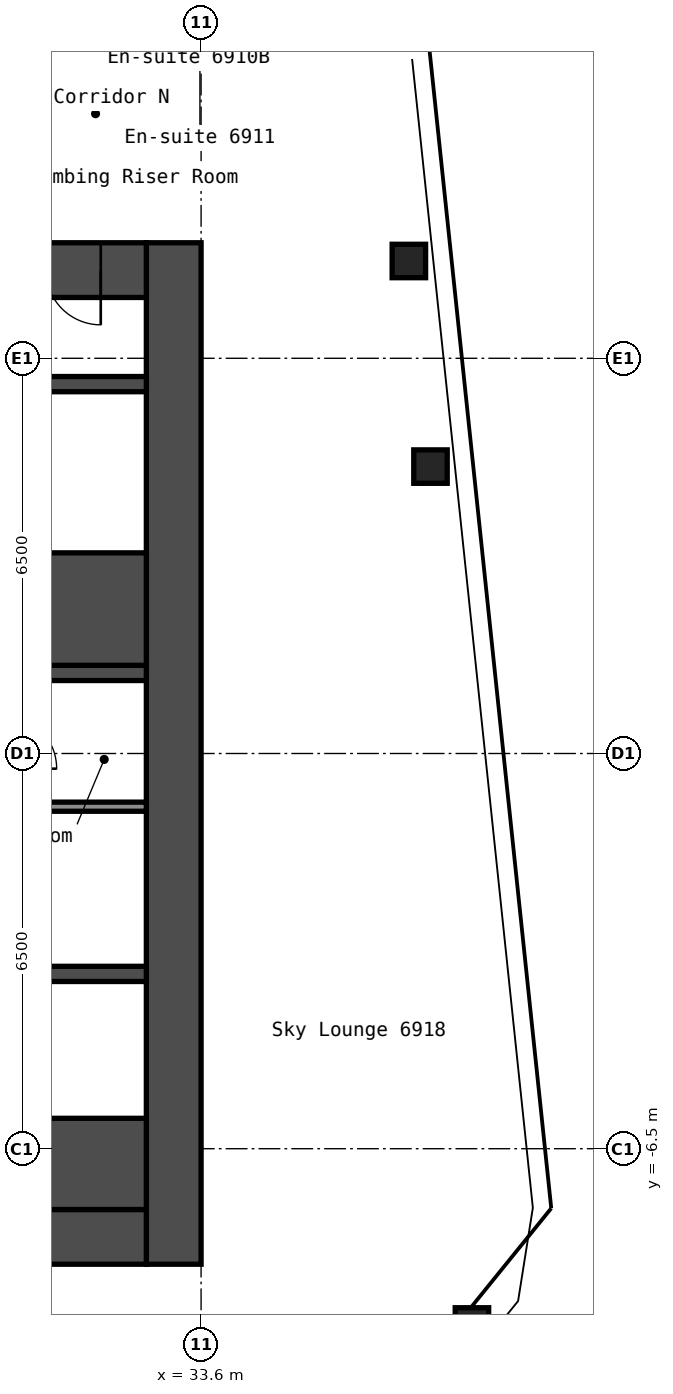
"""IFC4 building model, lengths in metres.
Left out: names, types, materials, properties, quantities, classifications, styles, units other than length and angle.
Written with IfcOpenShell. Run it as: python <this file> out.ifc"""

import sys

from ifc_helpers import new_model, si_unit, direction, frame, frame_2d, origin, origin_2d, place, context, subcontext, project, spatial, rectangle, hollow_rectangle, extrude, element, fill, save


model = new_model("IFC4")
c1 = context("Model", 3, precision=1e-05, world=origin(), true_north=direction((0.0, 1.0)))
c2 = subcontext(c1, "Body", "Model", "MODEL_VIEW")
j1 = project(units=[si_unit("LENGTHUNIT", "METRE"), si_unit("PLANEANGLEUNIT", "RADIAN")], contexts=[c1])
p1 = place(None, origin())
s1 = spatial("IfcSite", under=j1, at=p1, CompositionType="ELEMENT")
p2 = place(p1, origin())
s2 = spatial("IfcBuilding", under=s1, at=p2, CompositionType="ELEMENT")
p3 = place(p2, frame((0.0, 0.0, 245.4)))
s3 = spatial("IfcBuildingStorey", under=s2, at=p3, CompositionType="ELEMENT", Elevation=245.4)
for number, where, z_axis, x_axis in (
    (1, (38.054, -9.39, 0.0), (0.0, 0.0, 1.0), (1.0, 0.0, 0.0)),
    (2, (37.373, 4.719, 0.0), (0.0, 0.0, 1.0), (1.0, 0.0, 0.0)),
    (3, (37.017, 8.1, 0.0), (0.0, 0.0, 1.0), (1.0, 0.0, 0.0)),
):
    element("IfcColumn", number, at=place(p3, frame(where, z_axis=z_axis, x_axis=x_axis)), inside=s3, PredefinedType="COLUMN", context=c2, shape_type="SweptSolid", body=[
        extrude(hollow_rectangle(XDim=0.55, YDim=0.55, WallThickness=0.022, InnerFilletRadius=0.033, OuterFilletRadius=0.055, at=origin_2d()), origin(), (0.0, 0.0, 1.0), 2.75),
    ])
p4 = place(p3, frame((33.15, -8.4, 0.0), z_axis=(0.0, 0.0, 1.0), x_axis=(0.0, 1.0, 0.0)))
e4 = element("IfcWall", 4, at=p4, inside=s3, PredefinedType="SHEAR", context=c2, shape_type="SweptSolid", body=[
    extrude(rectangle(XDim=16.8, YDim=0.9, at=frame_2d((8.4, 0.0))), origin(), (0.0, 0.0, 1.0), 2.75),
])
p5 = place(p3, frame((17.7, 7.95, 0.0), z_axis=(0.0, 0.0, 1.0), x_axis=(1.0, 0.0, 0.0)))
e5 = element("IfcWall", 5, at=p5, inside=s3, PredefinedType="SHEAR", context=c2, shape_type="SweptSolid", body=[
    extrude(rectangle(XDim=15.0, YDim=0.9, at=frame_2d((7.5, 0.0))), origin(), (0.0, 0.0, 1.0), 2.75),
])
p6 = place(p5, frame((10.4, 0.0, 0.0)))
e6 = element("IfcOpeningElement", 6, at=p6, cuts=e5, PredefinedType="OPENING", context=c2, shape_type="SweptSolid", body=[
    extrude(rectangle(XDim=1.2, YDim=2.1, at=frame_2d((0.6, 1.05))), frame((0.0, 0.46, 0.0), z_axis=(0.0, -1.0, 0.0), x_axis=(1.0, 0.0, 0.0)), (0.0, 0.0, 1.0), 0.92),
])
p7 = place(p5, frame((13.35, 0.0, 0.0)))
e7 = element("IfcOpeningElement", 7, at=p7, cuts=e5, PredefinedType="OPENING", context=c2, shape_type="SweptSolid", body=[
    extrude(rectangle(XDim=0.9, YDim=2.1, at=frame_2d((0.45, 1.05))), frame((0.0, 0.46, 0.0), z_axis=(0.0, -1.0, 0.0), x_axis=(1.0, 0.0, 0.0)), (0.0, 0.0, 1.0), 0.92),
])
p8 = place(p3, frame((17.7, -7.95, 0.0), z_axis=(0.0, 0.0, 1.0), x_axis=(1.0, 0.0, 0.0)))
e8 = element("IfcWall", 8, at=p8, inside=s3, PredefinedType="SHEAR", context=c2, shape_type="SweptSolid", body=[
    extrude(rectangle(XDim=15.0, YDim=0.9, at=frame_2d((7.5, 0.0))), origin(), (0.0, 0.0, 1.0), 2.75),
])
p9 = place(p8, frame((2.55, 0.0, 0.0)))
e9 = element("IfcOpeningElement", 9, at=p9, cuts=e8, PredefinedType="OPENING", context=c2, shape_type="SweptSolid", body=[
    extrude(rectangle(XDim=1.0, YDim=2.1, at=frame_2d((0.5, 1.05))), frame((0.0, 0.46, 0.0), z_axis=(0.0, -1.0, 0.0), x_axis=(1.0, 0.0, 0.0)), (0.0, 0.0, 1.0), 0.92),
])
p10 = place(p3, frame((27.65, 1.325, 0.0), z_axis=(0.0, 0.0, 1.0), x_axis=(1.0, 0.0, 0.0)))
e10 = element("IfcWall", 10, at=p10, inside=s3, PredefinedType="SHEAR", context=c2, shape_type="SweptSolid", body=[
    extrude(rectangle(XDim=5.05, YDim=0.25, at=frame_2d((2.525, 0.0))), origin(), (0.0, 0.0, 1.0), 2.75),
])
p11 = place(p10, frame((0.55, 0.0, 0.0)))
e11 = element("IfcOpeningElement", 11, at=p11, cuts=e10, PredefinedType="OPENING", context=c2, shape_type="SweptSolid", body=[
    extrude(rectangle(XDim=1.2, YDim=2.1, at=frame_2d((0.6, 1.05))), frame((0.0, 0.135, 0.0), z_axis=(0.0, -1.0, 0.0), x_axis=(1.0, 0.0, 0.0)), (0.0, 0.0, 1.0), 0.27),
])
p12 = place(p3, frame((30.3, 2.375, 0.0), z_axis=(0.0, 0.0, 1.0), x_axis=(1.0, 0.0, 0.0)))
e12 = element("IfcWall", 12, at=p12, inside=s3, PredefinedType="SHEAR", context=c2, shape_type="SweptSolid", body=[
    extrude(rectangle(XDim=2.4, YDim=1.85, at=frame_2d((1.2, 0.0))), origin(), (0.0, 0.0, 1.0), 2.75),
])
p13 = place(p3, frame((30.3, 6.075, 0.0), z_axis=(0.0, 0.0, 1.0), x_axis=(1.0, 0.0, 0.0)))
e13 = element("IfcWall", 13, at=p13, inside=s3, PredefinedType="SHEAR", context=c2, shape_type="SweptSolid", body=[
    extrude(rectangle(XDim=2.4, YDim=0.25, at=frame_2d((1.2, 0.0))), origin(), (0.0, 0.0, 1.0), 2.75),
])
p14 = place(p3, frame((28.15, -3.625, 0.0), z_axis=(0.0, 0.0, 1.0), x_axis=(1.0, 0.0, 0.0)))
e14 = element("IfcWall", 14, at=p14, inside=s3, PredefinedType="SHEAR", context=c2, shape_type="SweptSolid", body=[
    extrude(rectangle(XDim=4.55, YDim=0.25, at=frame_2d((2.275, 0.0))), origin(), (0.0, 0.0, 1.0), 2.75),
])
p15 = place(p3, frame((28.15, -6.75, 0.0), z_axis=(0.0, 0.0, 1.0), x_axis=(1.0, 0.0, 0.0)))
e15 = element("IfcWall", 15, at=p15, inside=s3, PredefinedType="SHEAR", context=c2, shape_type="SweptSolid", body=[
    extrude(rectangle(XDim=4.55, YDim=1.5, at=frame_2d((2.275, 0.0))), origin(), (0.0, 0.0, 1.0), 2.75),
])
p16 = place(p3, frame((30.4, -0.875, 0.0), z_axis=(0.0, 0.0, 1.0), x_axis=(1.0, 0.0, 0.0)))
e16 = element("IfcWall", 16, at=p16, inside=s3, PredefinedType="PARTITIONING", context=c2, shape_type="SweptSolid", body=[
    extrude(rectangle(XDim=2.3, YDim=0.15, at=frame_2d((1.15, 0.0))), origin(), (0.0, 0.0, 1.0), 2.75),
])
p17 = place(p3, frame((16.048, 10.533, 0.0), z_axis=(0.0, 0.0, 1.0), x_axis=(0.994522460242, 0.104523088709, 0.0)))
e17 = element("IfcWall", 17, at=p17, inside=s3, PredefinedType="PARTITIONING", context=c2, shape_type="SweptSolid", body=[
    extrude(rectangle(XDim=21.3, YDim=0.2, at=frame_2d((10.65, 0.0))), origin(), (0.0, 0.0, 1.0), 2.75),
])
p18 = place(p17, frame((2.0, 0.0, 0.0)))
e18 = element("IfcOpeningElement", 18, at=p18, cuts=e17, PredefinedType="OPENING", context=c2, shape_type="SweptSolid", body=[
    extrude(rectangle(XDim=1.0, YDim=2.1, at=frame_2d((0.5, 1.05))), frame((0.0, 0.11, 0.0), z_axis=(0.0, -1.0, 0.0), x_axis=(1.0, 0.0, 0.0)), (0.0, 0.0, 1.0), 0.22),
])
p19 = place(p17, frame((11.25, 0.0, 0.0)))
e19 = element("IfcOpeningElement", 19, at=p19, cuts=e17, PredefinedType="OPENING", context=c2, shape_type="SweptSolid", body=[
    extrude(rectangle(XDim=1.0, YDim=2.1, at=frame_2d((0.5, 1.05))), frame((0.0, 0.11, 0.0), z_axis=(0.0, -1.0, 0.0), x_axis=(1.0, 0.0, 0.0)), (0.0, 0.0, 1.0), 0.22),
])
p20 = place(p17, frame((12.95, 0.0, 0.0)))
e20 = element("IfcOpeningElement", 20, at=p20, cuts=e17, PredefinedType="OPENING", context=c2, shape_type="SweptSolid", body=[
    extrude(rectangle(XDim=1.0, YDim=2.1, at=frame_2d((0.5, 1.05))), frame((0.0, 0.11, 0.0), z_axis=(0.0, -1.0, 0.0), x_axis=(1.0, 0.0, 0.0)), (0.0, 0.0, 1.0), 0.22),
])
p21 = place(p17, frame((19.65, 0.0, 0.0)))
e21 = element("IfcOpeningElement", 21, at=p21, cuts=e17, PredefinedType="OPENING", context=c2, shape_type="SweptSolid", body=[
    extrude(rectangle(XDim=1.0, YDim=2.1, at=frame_2d((0.5, 1.05))), frame((0.0, 0.11, 0.0), z_axis=(0.0, -1.0, 0.0), x_axis=(1.0, 0.0, 0.0)), (0.0, 0.0, 1.0), 0.22),
])
p22 = place(p7, origin())
e22 = element("IfcDoor", 22, at=p22, inside=s3, OperationType="SINGLE_SWING_RIGHT", PredefinedType="DOOR", context=c2, shape_type="SweptSolid", body=[
    extrude(rectangle(XDim=0.9, YDim=2.1, at=frame_2d((0.45, 1.05))), frame((0.0, 0.025, 0.0), z_axis=(0.0, -1.0, 0.0), x_axis=(1.0, 0.0, 0.0)), (0.0, 0.0, 1.0), 0.05),
])
fill(e7, e22)
save(model, sys.argv[1])
